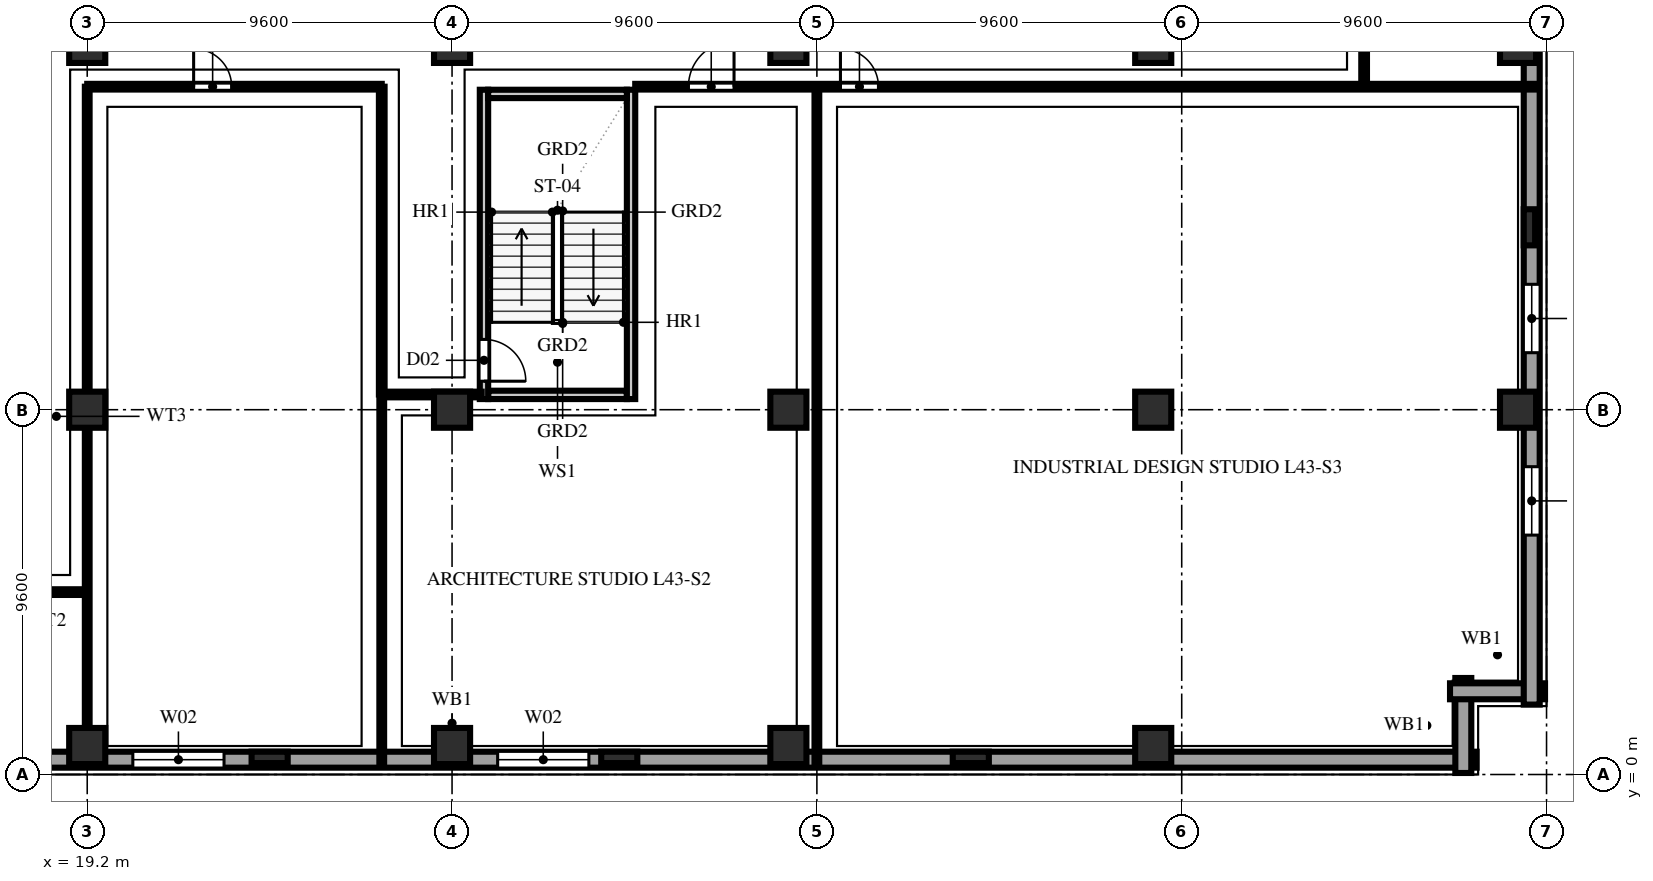
"""IFC4 building model, lengths in metres.
Left out: names, types, materials, properties, quantities, classifications, styles, units other than length and angle.
Written with IfcOpenShell. Run it as: python <this file> out.ifc"""

import sys

from ifc_helpers import new_model, si_unit, direction, frame, frame_2d, origin, origin_2d, place, context, subcontext, project, spatial, rectangle, extrude, element, fill, save


model = new_model("IFC4")
c1 = context("Model", 3, precision=1e-05, world=origin(), true_north=direction((0.0, 1.0)))
c2 = subcontext(c1, "Body", "Model", "MODEL_VIEW")
j1 = project(units=[si_unit("LENGTHUNIT", "METRE"), si_unit("PLANEANGLEUNIT", "RADIAN")], contexts=[c1])
p1 = place(None, origin())
s1 = spatial("IfcSite", under=j1, at=p1, CompositionType="ELEMENT")
p2 = place(p1, origin())
s2 = spatial("IfcBuilding", under=s1, at=p2, CompositionType="ELEMENT")
p3 = place(p2, frame((0.0, 0.0, 171.2)))
s3 = spatial("IfcBuildingStorey", under=s2, at=p3, CompositionType="ELEMENT", Elevation=171.2)
for number, where, z_axis, x_axis in (
    (1, (19.2, 0.75, 0.0), (0.0, 0.0, 1.0), (1.0, 0.0, 0.0)),
    (2, (19.2, 9.6, 0.0), (0.0, 0.0, 1.0), (1.0, 0.0, 0.0)),
    (3, (19.2, 19.2, 0.0), (0.0, 0.0, 1.0), (1.0, 0.0, 0.0)),
    (4, (28.8, 0.75, 0.0), (0.0, 0.0, 1.0), (1.0, 0.0, 0.0)),
    (5, (28.8, 9.6, 0.0), (0.0, 0.0, 1.0), (1.0, 0.0, 0.0)),
    (6, (28.8, 19.2, 0.0), (0.0, 0.0, 1.0), (1.0, 0.0, 0.0)),
    (7, (37.65, 0.75, 0.0), (0.0, 0.0, 1.0), (1.0, 0.0, 0.0)),
    (8, (37.65, 9.6, 0.0), (0.0, 0.0, 1.0), (1.0, 0.0, 0.0)),
    (9, (37.65, 19.2, 0.0), (0.0, 0.0, 1.0), (1.0, 0.0, 0.0)),
    (10, (47.25, 0.75, 0.0), (0.0, 0.0, 1.0), (1.0, 0.0, 0.0)),
    (11, (47.25, 9.6, 0.0), (0.0, 0.0, 1.0), (1.0, 0.0, 0.0)),
    (12, (47.25, 19.2, 0.0), (0.0, 0.0, 1.0), (1.0, 0.0, 0.0)),
    (13, (56.85, 9.6, 0.0), (0.0, 0.0, 1.0), (1.0, 0.0, 0.0)),
    (14, (56.85, 19.2, 0.0), (0.0, 0.0, 1.0), (1.0, 0.0, 0.0)),
):
    element("IfcColumn", number, at=place(p3, frame(where, z_axis=z_axis, x_axis=x_axis)), inside=s3, PredefinedType="COLUMN", context=c2, shape_type="SweptSolid", body=[
        extrude(rectangle(XDim=0.95, YDim=0.95, at=origin_2d()), origin(), (0.0, 0.0, 1.0), 3.8),
    ])
for number, where, z_axis, x_axis in (
    (15, (24.0, 0.45, 0.0), (0.0, 0.0, 1.0), (1.0, 0.0, 0.0)),
    (16, (33.2, 0.45, 0.0), (0.0, 0.0, 1.0), (1.0, 0.0, 0.0)),
    (17, (42.45, 0.45, 0.0), (0.0, 0.0, 1.0), (1.0, 0.0, 0.0)),
    (18, (57.15, 14.4, 0.0), (0.0, 0.0, 1.0), (0.0, 1.0, 0.0)),
):
    element("IfcColumn", number, at=place(p3, frame(where, z_axis=z_axis, x_axis=x_axis)), inside=s3, PredefinedType="PILASTER", context=c2, shape_type="SweptSolid", body=[
        extrude(rectangle(XDim=0.95, YDim=0.3, at=origin_2d()), origin(), (0.0, 0.0, 1.0), 3.8),
    ])
p4 = place(p3, frame((1.84, 0.39, 0.0), z_axis=(0.0, 0.0, 1.0), x_axis=(1.0, 0.0, 0.0)))
e19 = element("IfcWall", 19, at=p4, inside=s3, PredefinedType="SOLIDWALL", context=c2, shape_type="SweptSolid", body=[
    extrude(rectangle(XDim=53.92, YDim=0.42, at=frame_2d((26.96, 0.0))), origin(), (0.0, 0.0, 1.0), 3.54),
])
p5 = place(p4, frame((4.16, 0.0, 0.85)))
e20 = element("IfcOpeningElement", 20, at=p5, cuts=e19, PredefinedType="OPENING", context=c2, shape_type="SweptSolid", body=[
    extrude(rectangle(XDim=2.4, YDim=1.85, at=frame_2d((1.2, 0.925))), frame((0.0, 0.222, 0.0), z_axis=(0.0, -1.0, 0.0), x_axis=(1.0, 0.0, 0.0)), (0.0, 0.0, 1.0), 0.444),
])
p6 = place(p4, frame((8.96, 0.0, 0.85)))
e21 = element("IfcOpeningElement", 21, at=p6, cuts=e19, PredefinedType="OPENING", context=c2, shape_type="SweptSolid", body=[
    extrude(rectangle(XDim=2.4, YDim=1.85, at=frame_2d((1.2, 0.925))), frame((0.0, 0.222, 0.0), z_axis=(0.0, -1.0, 0.0), x_axis=(1.0, 0.0, 0.0)), (0.0, 0.0, 1.0), 0.444),
])
p7 = place(p4, frame((18.56, 0.0, 0.85)))
e22 = element("IfcOpeningElement", 22, at=p7, cuts=e19, PredefinedType="OPENING", context=c2, shape_type="SweptSolid", body=[
    extrude(rectangle(XDim=2.4, YDim=1.85, at=frame_2d((1.2, 0.925))), frame((0.0, 0.222, 0.0), z_axis=(0.0, -1.0, 0.0), x_axis=(1.0, 0.0, 0.0)), (0.0, 0.0, 1.0), 0.444),
])
p8 = place(p4, frame((28.16, 0.0, 0.85)))
e23 = element("IfcOpeningElement", 23, at=p8, cuts=e19, PredefinedType="OPENING", context=c2, shape_type="SweptSolid", body=[
    extrude(rectangle(XDim=2.4, YDim=1.85, at=frame_2d((1.2, 0.925))), frame((0.0, 0.222, 0.0), z_axis=(0.0, -1.0, 0.0), x_axis=(1.0, 0.0, 0.0)), (0.0, 0.0, 1.0), 0.444),
])
for number, where, z_axis, x_axis in (
    (24, (55.41, 0.04, 0.0), (0.0, 0.0, 1.0), (0.0, 1.0, 0.0)),
    (25, (55.06, 2.19, 0.0), (0.0, 0.0, 1.0), (1.0, 0.0, 0.0)),
):
    element("IfcWall", number, at=place(p3, frame(where, z_axis=z_axis, x_axis=x_axis)), inside=s3, PredefinedType="SOLIDWALL", context=c2, shape_type="SweptSolid", body=[
        extrude(rectangle(XDim=2.5, YDim=0.42, at=frame_2d((1.25, 0.0))), origin(), (0.0, 0.0, 1.0), 3.54),
    ])
p9 = place(p3, frame((57.21, 1.84, 0.0), z_axis=(0.0, 0.0, 1.0), x_axis=(0.0, 1.0, 0.0)))
e26 = element("IfcWall", 26, at=p9, inside=s3, PredefinedType="SOLIDWALL", context=c2, shape_type="SweptSolid", body=[
    extrude(rectangle(XDim=34.72, YDim=0.42, at=frame_2d((17.36, 0.0))), origin(), (0.0, 0.0, 1.0), 3.54),
])
p10 = place(p9, frame((4.46, 0.0, 0.85)))
e27 = element("IfcOpeningElement", 27, at=p10, cuts=e26, PredefinedType="OPENING", context=c2, shape_type="SweptSolid", body=[
    extrude(rectangle(XDim=1.8, YDim=1.85, at=frame_2d((0.9, 0.925))), frame((0.0, 0.222, 0.0), z_axis=(0.0, -1.0, 0.0), x_axis=(1.0, 0.0, 0.0)), (0.0, 0.0, 1.0), 0.444),
])
p11 = place(p9, frame((9.26, 0.0, 0.85)))
e28 = element("IfcOpeningElement", 28, at=p11, cuts=e26, PredefinedType="OPENING", context=c2, shape_type="SweptSolid", body=[
    extrude(rectangle(XDim=1.8, YDim=1.85, at=frame_2d((0.9, 0.925))), frame((0.0, 0.222, 0.0), z_axis=(0.0, -1.0, 0.0), x_axis=(1.0, 0.0, 0.0)), (0.0, 0.0, 1.0), 0.444),
])
p12 = place(p9, frame((23.66, 0.0, 0.85)))
e29 = element("IfcOpeningElement", 29, at=p12, cuts=e26, PredefinedType="OPENING", context=c2, shape_type="SweptSolid", body=[
    extrude(rectangle(XDim=1.8, YDim=1.85, at=frame_2d((0.9, 0.925))), frame((0.0, 0.222, 0.0), z_axis=(0.0, -1.0, 0.0), x_axis=(1.0, 0.0, 0.0)), (0.0, 0.0, 1.0), 0.444),
])
p13 = place(p9, frame((28.46, 0.0, 0.85)))
e30 = element("IfcOpeningElement", 30, at=p13, cuts=e26, PredefinedType="OPENING", context=c2, shape_type="SweptSolid", body=[
    extrude(rectangle(XDim=1.8, YDim=1.85, at=frame_2d((0.9, 0.925))), frame((0.0, 0.222, 0.0), z_axis=(0.0, -1.0, 0.0), x_axis=(1.0, 0.0, 0.0)), (0.0, 0.0, 1.0), 0.444),
])
p14 = place(p3, frame((29.75, 9.99, 0.0), z_axis=(0.0, 0.0, 1.0), x_axis=(1.0, 0.0, 0.0)))
e31 = element("IfcWall", 31, at=p14, inside=s3, PredefinedType="SOLIDWALL", context=c2, shape_type="SweptSolid", body=[
    extrude(rectangle(XDim=3.65, YDim=0.22, at=frame_2d((1.825, 0.0))), origin(), (0.0, 0.0, 1.0), 3.54),
])
p15 = place(p3, frame((29.64, 9.88, 0.0), z_axis=(0.0, 0.0, 1.0), x_axis=(0.0, 1.0, 0.0)))
e32 = element("IfcWall", 32, at=p15, inside=s3, PredefinedType="SOLIDWALL", context=c2, shape_type="SweptSolid", body=[
    extrude(rectangle(XDim=8.14, YDim=0.22, at=frame_2d((4.07, 0.0))), origin(), (0.0, 0.0, 1.0), 3.54),
])
p16 = place(p15, frame((0.47, 0.0, 0.0)))
e33 = element("IfcOpeningElement", 33, at=p16, cuts=e32, PredefinedType="OPENING", context=c2, shape_type="SweptSolid", body=[
    extrude(rectangle(XDim=1.1, YDim=2.2, at=frame_2d((0.55, 1.1))), frame((0.0, 0.122, 0.0), z_axis=(0.0, -1.0, 0.0), x_axis=(1.0, 0.0, 0.0)), (0.0, 0.0, 1.0), 0.244),
])
p17 = place(p3, frame((33.51, 9.88, 0.0), z_axis=(0.0, 0.0, 1.0), x_axis=(0.0, 1.0, 0.0)))
e34 = element("IfcWall", 34, at=p17, inside=s3, PredefinedType="SOLIDWALL", context=c2, shape_type="SweptSolid", body=[
    extrude(rectangle(XDim=8.14, YDim=0.22, at=frame_2d((4.07, 0.0))), origin(), (0.0, 0.0, 1.0), 3.54),
])
p18 = place(p3, frame((29.75, 17.91, 0.0), z_axis=(0.0, 0.0, 1.0), x_axis=(1.0, 0.0, 0.0)))
e35 = element("IfcWall", 35, at=p18, inside=s3, PredefinedType="SOLIDWALL", context=c2, shape_type="SweptSolid", body=[
    extrude(rectangle(XDim=3.65, YDim=0.22, at=frame_2d((1.825, 0.0))), origin(), (0.0, 0.0, 1.0), 3.54),
])
p19 = place(p3, frame((17.05, 4.8, 0.0), z_axis=(0.0, 0.0, 1.0), x_axis=(1.0, 0.0, 0.0)))
e36 = element("IfcWall", 36, at=p19, inside=s3, PredefinedType="PARTITIONING", context=c2, shape_type="SweptSolid", body=[
    extrude(rectangle(XDim=2.15, YDim=0.15, at=frame_2d((1.075, 0.0))), origin(), (0.0, 0.0, 1.0), 3.54),
])
p20 = place(p3, frame((52.8, 18.1, 0.0), z_axis=(0.0, 0.0, 1.0), x_axis=(0.0, 1.0, 0.0)))
e37 = element("IfcWall", 37, at=p20, inside=s3, PredefinedType="PARTITIONING", context=c2, shape_type="SweptSolid", body=[
    extrude(rectangle(XDim=2.85, YDim=0.15, at=frame_2d((1.425, 0.0))), origin(), (0.0, 0.0, 1.0), 3.54),
])
p21 = place(p3, frame((19.2, 0.22, 0.0), z_axis=(0.0, 0.0, 1.0), x_axis=(0.0, 1.0, 0.0)))
e38 = element("IfcWall", 38, at=p21, inside=s3, PredefinedType="PARTITIONING", context=c2, shape_type="SweptSolid", body=[
    extrude(rectangle(XDim=0.53, YDim=0.125, at=frame_2d((0.265, 0.0))), origin(), (0.0, 0.0, 1.0), 3.54),
])
p22 = place(p3, frame((19.2, 0.75, 0.0), z_axis=(0.0, 0.0, 1.0), x_axis=(0.0, 1.0, 0.0)))
e39 = element("IfcWall", 39, at=p22, inside=s3, PredefinedType="PARTITIONING", context=c2, shape_type="SweptSolid", body=[
    extrude(rectangle(XDim=17.35, YDim=0.125, at=frame_2d((8.675, 0.0))), origin(), (0.0, 0.0, 1.0), 2.923),
])
p23 = place(p3, frame((19.2, 18.1, 0.0), z_axis=(0.0, 0.0, 1.0), x_axis=(1.0, 0.0, 0.0)))
e40 = element("IfcWall", 40, at=p23, inside=s3, PredefinedType="PARTITIONING", context=c2, shape_type="SweptSolid", body=[
    extrude(rectangle(XDim=7.75, YDim=0.15, at=frame_2d((3.875, 0.0))), origin(), (0.0, 0.0, 1.0), 3.54),
])
p24 = place(p23, frame((2.8, 0.0, 0.0)))
e41 = element("IfcOpeningElement", 41, at=p24, cuts=e40, PredefinedType="OPENING", context=c2, shape_type="SweptSolid", body=[
    extrude(rectangle(XDim=1.0, YDim=2.2, at=frame_2d((0.5, 1.1))), frame((0.0, 0.087, 0.0), z_axis=(0.0, -1.0, 0.0), x_axis=(1.0, 0.0, 0.0)), (0.0, 0.0, 1.0), 0.174),
])
p25 = place(p3, frame((26.95, 0.22, 0.0), z_axis=(0.0, 0.0, 1.0), x_axis=(0.0, 1.0, 0.0)))
e42 = element("IfcWall", 42, at=p25, inside=s3, PredefinedType="PARTITIONING", context=c2, shape_type="SweptSolid", body=[
    extrude(rectangle(XDim=9.78, YDim=0.125, at=frame_2d((4.89, 0.0))), origin(), (0.0, 0.0, 1.0), 3.54),
])
p26 = place(p3, frame((26.95, 10.0, 0.0), z_axis=(0.0, 0.0, 1.0), x_axis=(0.0, 1.0, 0.0)))
e43 = element("IfcWall", 43, at=p26, inside=s3, PredefinedType="PARTITIONING", context=c2, shape_type="SweptSolid", body=[
    extrude(rectangle(XDim=8.1, YDim=0.15, at=frame_2d((4.05, 0.0))), origin(), (0.0, 0.0, 1.0), 3.54),
])
p27 = place(p3, frame((26.95, 10.0, 0.0), z_axis=(0.0, 0.0, 1.0), x_axis=(1.0, 0.0, 0.0)))
e44 = element("IfcWall", 44, at=p27, inside=s3, PredefinedType="PARTITIONING", context=c2, shape_type="SweptSolid", body=[
    extrude(rectangle(XDim=2.63, YDim=0.15, at=frame_2d((1.315, 0.0))), origin(), (0.0, 0.0, 1.0), 3.54),
])
p28 = place(p3, frame((38.4, 0.22, 0.0), z_axis=(0.0, 0.0, 1.0), x_axis=(0.0, 1.0, 0.0)))
e45 = element("IfcWall", 45, at=p28, inside=s3, PredefinedType="PARTITIONING", context=c2, shape_type="SweptSolid", body=[
    extrude(rectangle(XDim=17.88, YDim=0.125, at=frame_2d((8.94, 0.0))), origin(), (0.0, 0.0, 1.0), 3.54),
])
p29 = place(p3, frame((33.62, 18.1, 0.0), z_axis=(0.0, 0.0, 1.0), x_axis=(1.0, 0.0, 0.0)))
e46 = element("IfcWall", 46, at=p29, inside=s3, PredefinedType="PARTITIONING", context=c2, shape_type="SweptSolid", body=[
    extrude(rectangle(XDim=23.76, YDim=0.15, at=frame_2d((11.88, 0.0))), origin(), (0.0, 0.0, 1.0), 3.54),
])
p30 = place(p29, frame((1.4, 0.0, 0.0)))
e47 = element("IfcOpeningElement", 47, at=p30, cuts=e46, PredefinedType="OPENING", context=c2, shape_type="SweptSolid", body=[
    extrude(rectangle(XDim=1.2, YDim=2.2, at=frame_2d((0.6, 1.1))), frame((0.0, 0.087, 0.0), z_axis=(0.0, -1.0, 0.0), x_axis=(1.0, 0.0, 0.0)), (0.0, 0.0, 1.0), 0.174),
])
p31 = place(p29, frame((5.4, 0.0, 0.0)))
e48 = element("IfcOpeningElement", 48, at=p31, cuts=e46, PredefinedType="OPENING", context=c2, shape_type="SweptSolid", body=[
    extrude(rectangle(XDim=1.0, YDim=2.2, at=frame_2d((0.5, 1.1))), frame((0.0, 0.087, 0.0), z_axis=(0.0, -1.0, 0.0), x_axis=(1.0, 0.0, 0.0)), (0.0, 0.0, 1.0), 0.174),
])
p32 = place(p7, origin())
e49 = element("IfcWindow", 49, at=p32, inside=s3, PartitioningType="TRIPLE_PANEL_VERTICAL", PredefinedType="WINDOW", context=c2, shape_type="SweptSolid", body=[
    extrude(rectangle(XDim=2.4, YDim=1.85, at=frame_2d((1.2, 0.925))), frame((0.0, 0.11, 0.0), z_axis=(0.0, -1.0, 0.0), x_axis=(1.0, 0.0, 0.0)), (0.0, 0.0, 1.0), 0.06),
])
fill(e22, e49)
p33 = place(p8, origin())
e50 = element("IfcWindow", 50, at=p33, inside=s3, PartitioningType="TRIPLE_PANEL_VERTICAL", PredefinedType="WINDOW", context=c2, shape_type="SweptSolid", body=[
    extrude(rectangle(XDim=2.4, YDim=1.85, at=frame_2d((1.2, 0.925))), frame((0.0, 0.11, 0.0), z_axis=(0.0, -1.0, 0.0), x_axis=(1.0, 0.0, 0.0)), (0.0, 0.0, 1.0), 0.06),
])
fill(e23, e50)
p34 = place(p10, origin())
e51 = element("IfcWindow", 51, at=p34, inside=s3, PartitioningType="DOUBLE_PANEL_VERTICAL", PredefinedType="WINDOW", context=c2, shape_type="SweptSolid", body=[
    extrude(rectangle(XDim=1.8, YDim=1.85, at=frame_2d((0.9, 0.925))), frame((0.0, 0.11, 0.0), z_axis=(0.0, -1.0, 0.0), x_axis=(1.0, 0.0, 0.0)), (0.0, 0.0, 1.0), 0.06),
])
fill(e27, e51)
p35 = place(p11, origin())
e52 = element("IfcWindow", 52, at=p35, inside=s3, PartitioningType="DOUBLE_PANEL_VERTICAL", PredefinedType="WINDOW", context=c2, shape_type="SweptSolid", body=[
    extrude(rectangle(XDim=1.8, YDim=1.85, at=frame_2d((0.9, 0.925))), frame((0.0, 0.11, 0.0), z_axis=(0.0, -1.0, 0.0), x_axis=(1.0, 0.0, 0.0)), (0.0, 0.0, 1.0), 0.06),
])
fill(e28, e52)
p36 = place(p16, frame((1.1, 0.0, 0.0), z_axis=(0.0, 0.0, 1.0), x_axis=(-1.0, 0.0, 0.0)))
e53 = element("IfcDoor", 53, at=p36, inside=s3, OperationType="SINGLE_SWING_RIGHT", PredefinedType="DOOR", context=c2, shape_type="SweptSolid", body=[
    extrude(rectangle(XDim=1.1, YDim=2.2, at=frame_2d((0.55, 1.1))), frame((0.0, 0.025, 0.0), z_axis=(0.0, -1.0, 0.0), x_axis=(1.0, 0.0, 0.0)), (0.0, 0.0, 1.0), 0.05),
])
fill(e33, e53)
p37 = place(p24, origin())
e54 = element("IfcDoor", 54, at=p37, inside=s3, OperationType="SINGLE_SWING_LEFT", PredefinedType="DOOR", context=c2, shape_type="SweptSolid", body=[
    extrude(rectangle(XDim=1.0, YDim=2.2, at=frame_2d((0.5, 1.1))), frame((0.0, 0.025, 0.0), z_axis=(0.0, -1.0, 0.0), x_axis=(1.0, 0.0, 0.0)), (0.0, 0.0, 1.0), 0.05),
])
fill(e41, e54)
p38 = place(p30, origin())
e55 = element("IfcDoor", 55, at=p38, inside=s3, OperationType="SINGLE_SWING_RIGHT", PredefinedType="DOOR", context=c2, shape_type="SweptSolid", body=[
    extrude(rectangle(XDim=1.2, YDim=2.2, at=frame_2d((0.6, 1.1))), frame((0.0, 0.025, 0.0), z_axis=(0.0, -1.0, 0.0), x_axis=(1.0, 0.0, 0.0)), (0.0, 0.0, 1.0), 0.05),
])
fill(e47, e55)
p39 = place(p31, origin())
e56 = element("IfcDoor", 56, at=p39, inside=s3, OperationType="SINGLE_SWING_LEFT", PredefinedType="DOOR", context=c2, shape_type="SweptSolid", body=[
    extrude(rectangle(XDim=1.0, YDim=2.2, at=frame_2d((0.5, 1.1))), frame((0.0, 0.025, 0.0), z_axis=(0.0, -1.0, 0.0), x_axis=(1.0, 0.0, 0.0)), (0.0, 0.0, 1.0), 0.05),
])
fill(e48, e56)
save(model, sys.argv[1])
